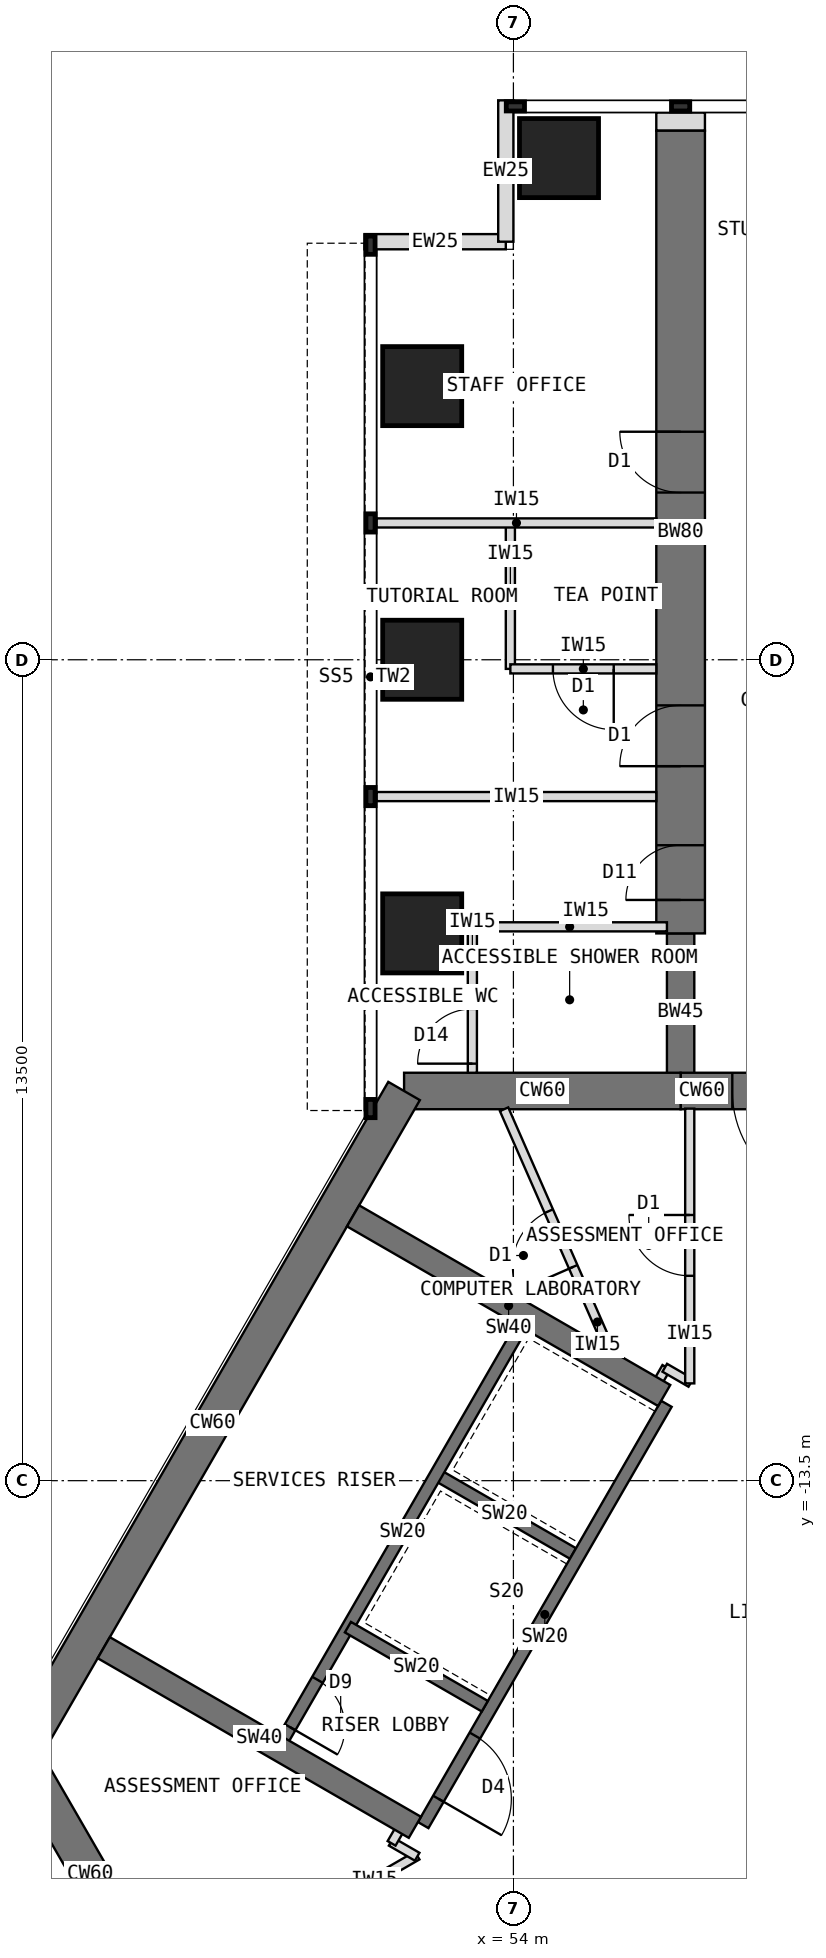
"""IFC4 building model, lengths in metres.
Left out: names, types, materials, properties, quantities, classifications, styles, units other than length and angle.
Written with IfcOpenShell. Run it as: python <this file> out.ifc"""

import sys

from ifc_helpers import new_model, si_unit, direction, frame, frame_2d, origin, origin_2d, place, context, subcontext, project, spatial, rectangle, extrude, element, fill, save


model = new_model("IFC4")
c1 = context("Model", 3, precision=1e-05, world=origin(), true_north=direction((0.0, 1.0)))
c2 = subcontext(c1, "Body", "Model", "MODEL_VIEW")
j1 = project(units=[si_unit("LENGTHUNIT", "METRE"), si_unit("PLANEANGLEUNIT", "RADIAN")], contexts=[c1])
p1 = place(None, origin())
s1 = spatial("IfcSite", under=j1, at=p1, CompositionType="ELEMENT")
p2 = place(p1, origin())
s2 = spatial("IfcBuilding", under=s1, at=p2, CompositionType="ELEMENT")
p3 = place(p2, frame((0.0, 0.0, 121.5)))
s3 = spatial("IfcBuildingStorey", under=s2, at=p3, CompositionType="ELEMENT", Elevation=121.5)
p4 = place(p3, frame((60.25, -7.092, 0.0), z_axis=(0.0, 0.0, 1.0), x_axis=(-1.0, 0.0, 0.0)))
e1 = element("IfcWall", 1, at=p4, inside=s3, PredefinedType="SHEAR", context=c2, shape_type="SweptSolid", body=[
    extrude(rectangle(XDim=3.5, YDim=0.6, at=frame_2d((1.75, 0.0))), origin(), (0.0, 0.0, 1.0), 4.0),
])
p5 = place(p4, frame((0.85, 0.0, 0.0)))
e2 = element("IfcOpeningElement", 2, at=p5, cuts=e1, PredefinedType="OPENING", context=c2, shape_type="SweptSolid", body=[
    extrude(rectangle(XDim=1.8, YDim=2.1, at=frame_2d((0.9, 1.05))), frame((0.0, 0.31, 0.0), z_axis=(0.0, -1.0, 0.0), x_axis=(1.0, 0.0, 0.0)), (0.0, 0.0, 1.0), 0.62),
])
p6 = place(p3, frame((56.75, -7.092, 0.0), z_axis=(0.0, 0.0, 1.0), x_axis=(-1.0, 0.0, 0.0)))
e3 = element("IfcWall", 3, at=p6, inside=s3, PredefinedType="SHEAR", context=c2, shape_type="SweptSolid", body=[
    extrude(rectangle(XDim=4.548, YDim=0.6, at=frame_2d((2.274, 0.0))), origin(), (0.0, 0.0, 1.0), 4.0),
])
p7 = place(p3, frame((52.202, -7.092, 0.0), z_axis=(0.0, 0.0, 1.0), x_axis=(-0.500005998175, -0.866021940709, 0.0)))
e4 = element("IfcWall", 4, at=p7, inside=s3, PredefinedType="SHEAR", context=c2, shape_type="SweptSolid", body=[
    extrude(rectangle(XDim=12.596, YDim=0.6, at=frame_2d((6.298, 0.0))), origin(), (0.0, 0.0, 1.0), 4.0),
])
p8 = place(p3, frame((45.904, -18.0, 0.0), z_axis=(0.0, 0.0, 1.0), x_axis=(0.500024481964, -0.866011268655, 0.0)))
e5 = element("IfcWall", 5, at=p8, inside=s3, PredefinedType="SHEAR", context=c2, shape_type="SweptSolid", body=[
    extrude(rectangle(XDim=4.548, YDim=0.6, at=frame_2d((2.274, 0.0))), origin(), (0.0, 0.0, 1.0), 4.0),
])
p9 = place(p3, frame((56.75, -7.092, 0.0), z_axis=(0.0, 0.0, 1.0), x_axis=(0.0, 1.0, 0.0)))
e6 = element("IfcWall", 6, at=p9, inside=s3, PredefinedType="SHEAR", context=c2, shape_type="SweptSolid", body=[
    extrude(rectangle(XDim=2.592, YDim=0.45, at=frame_2d((1.296, 0.0))), origin(), (0.0, 0.0, 1.0), 4.0),
])
p10 = place(p3, frame((56.75, -4.5, 0.0), z_axis=(0.0, 0.0, 1.0), x_axis=(0.0, 1.0, 0.0)))
e7 = element("IfcWall", 7, at=p10, inside=s3, PredefinedType="SHEAR", context=c2, shape_type="SweptSolid", body=[
    extrude(rectangle(XDim=13.2, YDim=0.8, at=frame_2d((6.6, 0.0))), origin(), (0.0, 0.0, 1.0), 4.0),
])
p11 = place(p10, frame((0.55, 0.0, 0.0)))
e8 = element("IfcOpeningElement", 8, at=p11, cuts=e7, PredefinedType="OPENING", context=c2, shape_type="SweptSolid", body=[
    extrude(rectangle(XDim=0.9, YDim=2.1, at=frame_2d((0.45, 1.05))), frame((0.0, 0.41, 0.0), z_axis=(0.0, -1.0, 0.0), x_axis=(1.0, 0.0, 0.0)), (0.0, 0.0, 1.0), 0.82),
])
p12 = place(p10, frame((2.75, 0.0, 0.0)))
e9 = element("IfcOpeningElement", 9, at=p12, cuts=e7, PredefinedType="OPENING", context=c2, shape_type="SweptSolid", body=[
    extrude(rectangle(XDim=1.0, YDim=2.1, at=frame_2d((0.5, 1.05))), frame((0.0, 0.41, 0.0), z_axis=(0.0, -1.0, 0.0), x_axis=(1.0, 0.0, 0.0)), (0.0, 0.0, 1.0), 0.82),
])
p13 = place(p10, frame((7.25, 0.0, 0.0)))
e10 = element("IfcOpeningElement", 10, at=p13, cuts=e7, PredefinedType="OPENING", context=c2, shape_type="SweptSolid", body=[
    extrude(rectangle(XDim=1.0, YDim=2.1, at=frame_2d((0.5, 1.05))), frame((0.0, 0.41, 0.0), z_axis=(0.0, -1.0, 0.0), x_axis=(1.0, 0.0, 0.0)), (0.0, 0.0, 1.0), 0.82),
])
for number, where, z_axis, x_axis in (
    (11, (52.5, -4.5, 0.0), (0.0, 0.0, 1.0), (1.0, 0.0, 0.0)),
    (12, (52.5, 0.0, 0.0), (0.0, 0.0, 1.0), (1.0, 0.0, 0.0)),
    (13, (52.5, 4.5, 0.0), (0.0, 0.0, 1.0), (1.0, 0.0, 0.0)),
    (14, (54.75, 8.25, 0.0), (0.0, 0.0, 1.0), (1.0, 0.0, 0.0)),
):
    element("IfcColumn", number, at=place(p3, frame(where, z_axis=z_axis, x_axis=x_axis)), inside=s3, PredefinedType="COLUMN", context=c2, shape_type="SweptSolid", body=[
        extrude(rectangle(XDim=1.3, YDim=1.3, at=origin_2d()), origin(), (0.0, 0.0, 1.0), 4.0),
    ])
for number, where, z_axis, x_axis in (
    (15, (51.55, 6.875, 0.0), (0.0, 0.0, 1.0), (1.0, 0.0, 0.0)),
    (16, (53.875, 6.875, 0.0), (0.0, 0.0, 1.0), (0.0, 1.0, 0.0)),
):
    element("IfcWall", number, at=place(p3, frame(where, z_axis=z_axis, x_axis=x_axis)), inside=s3, PredefinedType="STANDARD", context=c2, shape_type="SweptSolid", body=[
        extrude(rectangle(XDim=2.325, YDim=0.25, at=frame_2d((1.163, 0.0))), origin(), (0.0, 0.0, 1.0), 3.8),
    ])
p14 = place(p3, frame((56.75, 8.7, 0.0), z_axis=(0.0, 0.0, 1.0), x_axis=(0.0, 1.0, 0.0)))
e17 = element("IfcWall", 17, at=p14, inside=s3, PredefinedType="PARTITIONING", context=c2, shape_type="SweptSolid", body=[
    extrude(rectangle(XDim=0.3, YDim=0.8, at=frame_2d((0.15, 0.0))), origin(), (0.0, 0.0, 1.0), 3.8),
])
p15 = place(p3, frame((56.516, -12.236, 0.0), z_axis=(0.0, 0.0, 1.0), x_axis=(-0.49999894854, -0.866026010844, 0.0)))
e18 = element("IfcWall", 18, at=p15, inside=s3, PredefinedType="SHEAR", context=c2, shape_type="SweptSolid", body=[
    extrude(rectangle(XDim=8.0, YDim=0.2, at=frame_2d((4.0, 0.0))), origin(), (0.0, 0.0, 1.0), 4.0),
])
p16 = place(p15, frame((6.3, 0.0, 0.0)))
e19 = element("IfcOpeningElement", 19, at=p16, cuts=e18, PredefinedType="OPENING", context=c2, shape_type="SweptSolid", body=[
    extrude(rectangle(XDim=1.2, YDim=2.1, at=frame_2d((0.6, 1.05))), frame((0.0, 0.11, 0.0), z_axis=(0.0, -1.0, 0.0), x_axis=(1.0, 0.0, 0.0)), (0.0, 0.0, 1.0), 0.22),
])
for number, where, z_axis, x_axis in (
    (20, (54.98, -14.697, 0.0), (0.0, 0.0, 1.0), (-0.866, 0.5, 0.0)),
    (21, (53.53, -17.209, 0.0), (0.0, 0.0, 1.0), (-0.866, 0.5, 0.0)),
):
    element("IfcWall", number, at=place(p3, frame(where, z_axis=z_axis, x_axis=x_axis)), inside=s3, PredefinedType="SHEAR", context=c2, shape_type="SweptSolid", body=[
        extrude(rectangle(XDim=2.6, YDim=0.2, at=frame_2d((1.3, 0.0))), origin(), (0.0, 0.0, 1.0), 4.0),
    ])
p17 = place(p3, frame((54.178, -10.886, 0.0), z_axis=(0.0, 0.0, 1.0), x_axis=(-0.49999894854, -0.866026010844, 0.0)))
e22 = element("IfcWall", 22, at=p17, inside=s3, PredefinedType="SHEAR", context=c2, shape_type="SweptSolid", body=[
    extrude(rectangle(XDim=8.0, YDim=0.2, at=frame_2d((4.0, 0.0))), origin(), (0.0, 0.0, 1.0), 4.0),
])
p18 = place(p17, frame((6.8, 0.0, 0.0)))
e23 = element("IfcOpeningElement", 23, at=p18, cuts=e22, PredefinedType="OPENING", context=c2, shape_type="SweptSolid", body=[
    extrude(rectangle(XDim=0.9, YDim=2.1, at=frame_2d((0.45, 1.05))), frame((0.0, 0.11, 0.0), z_axis=(0.0, -1.0, 0.0), x_axis=(1.0, 0.0, 0.0)), (0.0, 0.0, 1.0), 0.22),
])
p19 = place(p3, frame((52.38, -19.201, 0.0), z_axis=(0.0, 0.0, 1.0), x_axis=(-0.866027317282, 0.49999668571, 0.0)))
e24 = element("IfcWall", 24, at=p19, inside=s3, PredefinedType="SHEAR", context=c2, shape_type="SweptSolid", body=[
    extrude(rectangle(XDim=5.908, YDim=0.4, at=frame_2d((2.954, 0.0))), origin(), (0.0, 0.0, 1.0), 4.0),
])
p20 = place(p3, frame((56.48, -12.099, 0.0), z_axis=(0.0, 0.0, 1.0), x_axis=(-0.866009424208, 0.500027676417, 0.0)))
e25 = element("IfcWall", 25, at=p20, inside=s3, PredefinedType="SHEAR", context=c2, shape_type="SweptSolid", body=[
    extrude(rectangle(XDim=5.908, YDim=0.4, at=frame_2d((2.954, 0.0))), origin(), (0.0, 0.0, 1.0), 4.0),
])
for number, where, z_axis, x_axis in (
    (26, (56.35, -2.25, 0.0), (0.0, 0.0, 1.0), (-1.0, 0.0, 0.0)),
    (27, (56.35, 2.25, 0.0), (0.0, 0.0, 1.0), (-1.0, 0.0, 0.0)),
):
    element("IfcWall", number, at=place(p3, frame(where, z_axis=z_axis, x_axis=x_axis)), inside=s3, PredefinedType="PARTITIONING", context=c2, shape_type="SweptSolid", body=[
        extrude(rectangle(XDim=4.6, YDim=0.15, at=frame_2d((2.3, 0.0))), origin(), (0.0, 0.0, 1.0), 3.8),
    ])
p21 = place(p3, frame((53.95, -0.15, 0.0), z_axis=(0.0, 0.0, 1.0), x_axis=(0.0, 1.0, 0.0)))
e28 = element("IfcWall", 28, at=p21, inside=s3, PredefinedType="PARTITIONING", context=c2, shape_type="SweptSolid", body=[
    extrude(rectangle(XDim=2.4, YDim=0.15, at=frame_2d((1.2, 0.0))), origin(), (0.0, 0.0, 1.0), 3.8),
])
p22 = place(p3, frame((56.35, -0.15, 0.0), z_axis=(0.0, 0.0, 1.0), x_axis=(-1.0, 0.0, 0.0)))
e29 = element("IfcWall", 29, at=p22, inside=s3, PredefinedType="PARTITIONING", context=c2, shape_type="SweptSolid", body=[
    extrude(rectangle(XDim=2.4, YDim=0.15, at=frame_2d((1.2, 0.0))), origin(), (0.0, 0.0, 1.0), 3.8),
])
p23 = place(p22, frame((0.7, 0.0, 0.0)))
e30 = element("IfcOpeningElement", 30, at=p23, cuts=e29, PredefinedType="OPENING", context=c2, shape_type="SweptSolid", body=[
    extrude(rectangle(XDim=1.0, YDim=2.1, at=frame_2d((0.5, 1.05))), frame((0.0, 0.085, 0.0), z_axis=(0.0, -1.0, 0.0), x_axis=(1.0, 0.0, 0.0)), (0.0, 0.0, 1.0), 0.17),
])
p24 = place(p3, frame((53.325, -6.792, 0.0), z_axis=(0.0, 0.0, 1.0), x_axis=(0.0, 1.0, 0.0)))
e31 = element("IfcWall", 31, at=p24, inside=s3, PredefinedType="PARTITIONING", context=c2, shape_type="SweptSolid", body=[
    extrude(rectangle(XDim=2.4, YDim=0.15, at=frame_2d((1.2, 0.0))), origin(), (0.0, 0.0, 1.0), 3.8),
])
p25 = place(p24, frame((0.15, 0.0, 0.0)))
e32 = element("IfcOpeningElement", 32, at=p25, cuts=e31, PredefinedType="OPENING", context=c2, shape_type="SweptSolid", body=[
    extrude(rectangle(XDim=0.9, YDim=2.1, at=frame_2d((0.45, 1.05))), frame((0.0, 0.085, 0.0), z_axis=(0.0, -1.0, 0.0), x_axis=(1.0, 0.0, 0.0)), (0.0, 0.0, 1.0), 0.17),
])
p26 = place(p3, frame((56.525, -4.392, 0.0), z_axis=(0.0, 0.0, 1.0), x_axis=(-1.0, 0.0, 0.0)))
e33 = element("IfcWall", 33, at=p26, inside=s3, PredefinedType="PARTITIONING", context=c2, shape_type="SweptSolid", body=[
    extrude(rectangle(XDim=3.2, YDim=0.15, at=frame_2d((1.6, 0.0))), origin(), (0.0, 0.0, 1.0), 3.8),
])
p27 = place(p3, frame((48.504, -21.924, 0.0), z_axis=(0.0, 0.0, 1.0), x_axis=(0.866006515865, 0.500032713409, 0.0)))
e34 = element("IfcWall", 34, at=p27, inside=s3, PredefinedType="PARTITIONING", context=c2, shape_type="SweptSolid", body=[
    extrude(rectangle(XDim=4.518, YDim=0.15, at=frame_2d((2.259, 0.0))), origin(), (0.0, 0.0, 1.0), 3.8),
])
p28 = place(p27, frame((1.749, 0.0, 0.0)))
e35 = element("IfcOpeningElement", 35, at=p28, cuts=e34, PredefinedType="OPENING", context=c2, shape_type="SweptSolid", body=[
    extrude(rectangle(XDim=1.0, YDim=2.1, at=frame_2d((0.5, 1.05))), frame((0.0, 0.085, 0.0), z_axis=(0.0, -1.0, 0.0), x_axis=(1.0, 0.0, 0.0)), (0.0, 0.0, 1.0), 0.17),
])
p29 = place(p3, frame((52.417, -19.684, 0.0), z_axis=(0.0, 0.0, 1.0), x_axis=(-0.865831790172, 0.50033519877, 0.0)))
e36 = element("IfcWall", 36, at=p29, inside=s3, PredefinedType="PARTITIONING", context=c2, shape_type="SweptSolid", body=[
    extrude(rectangle(XDim=0.494, YDim=0.15, at=frame_2d((0.247, 0.0))), origin(), (0.0, 0.0, 1.0), 3.8),
])
for number, where, z_axis, x_axis in (
    (37, (51.997, -19.464, 0.0), (0.0, 0.0, 1.0), (0.5, 0.866, 0.0)),
    (38, (56.302, -12.008, 0.0), (0.0, 0.0, 1.0), (0.5, 0.866, 0.0)),
):
    element("IfcWall", number, at=place(p3, frame(where, z_axis=z_axis, x_axis=x_axis)), inside=s3, PredefinedType="PARTITIONING", context=c2, shape_type="SweptSolid", body=[
        extrude(rectangle(XDim=0.43, YDim=0.15, at=frame_2d((0.215, 0.0))), origin(), (0.0, 0.0, 1.0), 3.8),
    ])
p30 = place(p3, frame((56.489, -11.643, 0.0), z_axis=(0.0, 0.0, 1.0), x_axis=(0.865831790172, -0.50033519877, 0.0)))
e39 = element("IfcWall", 39, at=p30, inside=s3, PredefinedType="PARTITIONING", context=c2, shape_type="SweptSolid", body=[
    extrude(rectangle(XDim=0.494, YDim=0.15, at=frame_2d((0.247, 0.0))), origin(), (0.0, 0.0, 1.0), 3.8),
])
p31 = place(p3, frame((56.9, -11.9, 0.0), z_axis=(0.0, 0.0, 1.0), x_axis=(0.0, 1.0, 0.0)))
e40 = element("IfcWall", 40, at=p31, inside=s3, PredefinedType="PARTITIONING", context=c2, shape_type="SweptSolid", body=[
    extrude(rectangle(XDim=4.519, YDim=0.15, at=frame_2d((2.259, 0.0))), origin(), (0.0, 0.0, 1.0), 3.8),
])
p32 = place(p31, frame((1.769, 0.0, 0.0)))
e41 = element("IfcOpeningElement", 41, at=p32, cuts=e40, PredefinedType="OPENING", context=c2, shape_type="SweptSolid", body=[
    extrude(rectangle(XDim=1.0, YDim=2.1, at=frame_2d((0.5, 1.05))), frame((0.0, 0.085, 0.0), z_axis=(0.0, -1.0, 0.0), x_axis=(1.0, 0.0, 0.0)), (0.0, 0.0, 1.0), 0.17),
])
p33 = place(p3, frame((55.719, -11.66, 0.0), z_axis=(0.0, 0.0, 1.0), x_axis=(-0.401686926791, 0.915777054116, 0.0)))
e42 = element("IfcWall", 42, at=p33, inside=s3, PredefinedType="PARTITIONING", context=c2, shape_type="SweptSolid", body=[
    extrude(rectangle(XDim=4.661, YDim=0.15, at=frame_2d((2.331, 0.0))), origin(), (0.0, 0.0, 1.0), 3.8),
])
p34 = place(p33, frame((1.831, 0.0, 0.0)))
e43 = element("IfcOpeningElement", 43, at=p34, cuts=e42, PredefinedType="OPENING", context=c2, shape_type="SweptSolid", body=[
    extrude(rectangle(XDim=1.0, YDim=2.1, at=frame_2d((0.5, 1.05))), frame((0.0, 0.085, 0.0), z_axis=(0.0, -1.0, 0.0), x_axis=(1.0, 0.0, 0.0)), (0.0, 0.0, 1.0), 0.17),
])
p35 = place(p16, origin())
e44 = element("IfcDoor", 44, at=p35, inside=s3, OperationType="SINGLE_SWING_RIGHT", PredefinedType="DOOR", context=c2, shape_type="SweptSolid", body=[
    extrude(rectangle(XDim=1.2, YDim=2.1, at=frame_2d((0.6, 1.05))), frame((0.0, 0.025, 0.0), z_axis=(0.0, -1.0, 0.0), x_axis=(1.0, 0.0, 0.0)), (0.0, 0.0, 1.0), 0.05),
])
fill(e19, e44)
p36 = place(p18, origin())
e45 = element("IfcDoor", 45, at=p36, inside=s3, OperationType="SINGLE_SWING_RIGHT", PredefinedType="DOOR", context=c2, shape_type="SweptSolid", body=[
    extrude(rectangle(XDim=0.9, YDim=2.1, at=frame_2d((0.45, 1.05))), frame((0.0, 0.025, 0.0), z_axis=(0.0, -1.0, 0.0), x_axis=(1.0, 0.0, 0.0)), (0.0, 0.0, 1.0), 0.05),
])
fill(e23, e45)
p37 = place(p5, origin())
e46 = element("IfcDoor", 46, at=p37, inside=s3, OperationType="DOUBLE_DOOR_DOUBLE_SWING", PredefinedType="DOOR", context=c2, shape_type="SweptSolid", body=[
    extrude(rectangle(XDim=1.72, YDim=2.06, at=frame_2d((0.9, 1.03))), frame((0.0, 0.025, 0.0), z_axis=(0.0, -1.0, 0.0), x_axis=(1.0, 0.0, 0.0)), (0.0, 0.0, 1.0), 0.05),
    extrude(rectangle(XDim=0.04, YDim=2.1, at=frame_2d((0.02, 1.05))), frame((0.0, 0.3, 0.0), z_axis=(0.0, -1.0, 0.0), x_axis=(1.0, 0.0, 0.0)), (0.0, 0.0, 1.0), 0.6),
    extrude(rectangle(XDim=0.04, YDim=2.1, at=frame_2d((1.78, 1.05))), frame((0.0, 0.3, 0.0), z_axis=(0.0, -1.0, 0.0), x_axis=(1.0, 0.0, 0.0)), (0.0, 0.0, 1.0), 0.6),
    extrude(rectangle(XDim=1.72, YDim=0.04, at=frame_2d((0.9, 2.08))), frame((0.0, 0.3, 0.0), z_axis=(0.0, -1.0, 0.0), x_axis=(1.0, 0.0, 0.0)), (0.0, 0.0, 1.0), 0.6),
])
fill(e2, e46)
p38 = place(p23, origin())
e47 = element("IfcDoor", 47, at=p38, inside=s3, OperationType="SINGLE_SWING_LEFT", PredefinedType="DOOR", context=c2, shape_type="SweptSolid", body=[
    extrude(rectangle(XDim=1.0, YDim=2.1, at=frame_2d((0.5, 1.05))), frame((0.0, 0.025, 0.0), z_axis=(0.0, -1.0, 0.0), x_axis=(1.0, 0.0, 0.0)), (0.0, 0.0, 1.0), 0.05),
])
fill(e30, e47)
p39 = place(p25, origin())
e48 = element("IfcDoor", 48, at=p39, inside=s3, OperationType="SINGLE_SWING_LEFT", PredefinedType="DOOR", context=c2, shape_type="SweptSolid", body=[
    extrude(rectangle(XDim=0.9, YDim=2.1, at=frame_2d((0.45, 1.05))), frame((0.0, 0.025, 0.0), z_axis=(0.0, -1.0, 0.0), x_axis=(1.0, 0.0, 0.0)), (0.0, 0.0, 1.0), 0.05),
])
fill(e32, e48)
p40 = place(p34, origin())
e49 = element("IfcDoor", 49, at=p40, inside=s3, OperationType="SINGLE_SWING_LEFT", PredefinedType="DOOR", context=c2, shape_type="SweptSolid", body=[
    extrude(rectangle(XDim=1.0, YDim=2.1, at=frame_2d((0.5, 1.05))), frame((0.0, 0.025, 0.0), z_axis=(0.0, -1.0, 0.0), x_axis=(1.0, 0.0, 0.0)), (0.0, 0.0, 1.0), 0.05),
])
fill(e43, e49)
p41 = place(p32, origin())
e50 = element("IfcDoor", 50, at=p41, inside=s3, OperationType="SINGLE_SWING_RIGHT", PredefinedType="DOOR", context=c2, shape_type="SweptSolid", body=[
    extrude(rectangle(XDim=1.0, YDim=2.1, at=frame_2d((0.5, 1.05))), frame((0.0, 0.025, 0.0), z_axis=(0.0, -1.0, 0.0), x_axis=(1.0, 0.0, 0.0)), (0.0, 0.0, 1.0), 0.05),
])
fill(e41, e50)
p42 = place(p11, origin())
e51 = element("IfcDoor", 51, at=p42, inside=s3, OperationType="SINGLE_SWING_LEFT", PredefinedType="DOOR", context=c2, shape_type="SweptSolid", body=[
    extrude(rectangle(XDim=0.82, YDim=2.06, at=frame_2d((0.45, 1.03))), frame((0.0, 0.025, 0.0), z_axis=(0.0, -1.0, 0.0), x_axis=(1.0, 0.0, 0.0)), (0.0, 0.0, 1.0), 0.05),
    extrude(rectangle(XDim=0.04, YDim=2.1, at=frame_2d((0.02, 1.05))), frame((0.0, 0.4, 0.0), z_axis=(0.0, -1.0, 0.0), x_axis=(1.0, 0.0, 0.0)), (0.0, 0.0, 1.0), 0.8),
    extrude(rectangle(XDim=0.04, YDim=2.1, at=frame_2d((0.88, 1.05))), frame((0.0, 0.4, 0.0), z_axis=(0.0, -1.0, 0.0), x_axis=(1.0, 0.0, 0.0)), (0.0, 0.0, 1.0), 0.8),
    extrude(rectangle(XDim=0.82, YDim=0.04, at=frame_2d((0.45, 2.08))), frame((0.0, 0.4, 0.0), z_axis=(0.0, -1.0, 0.0), x_axis=(1.0, 0.0, 0.0)), (0.0, 0.0, 1.0), 0.8),
])
fill(e8, e51)
p43 = place(p12, origin())
e52 = element("IfcDoor", 52, at=p43, inside=s3, OperationType="SINGLE_SWING_LEFT", PredefinedType="DOOR", context=c2, shape_type="SweptSolid", body=[
    extrude(rectangle(XDim=0.92, YDim=2.06, at=frame_2d((0.5, 1.03))), frame((0.0, 0.025, 0.0), z_axis=(0.0, -1.0, 0.0), x_axis=(1.0, 0.0, 0.0)), (0.0, 0.0, 1.0), 0.05),
    extrude(rectangle(XDim=0.04, YDim=2.1, at=frame_2d((0.02, 1.05))), frame((0.0, 0.4, 0.0), z_axis=(0.0, -1.0, 0.0), x_axis=(1.0, 0.0, 0.0)), (0.0, 0.0, 1.0), 0.8),
    extrude(rectangle(XDim=0.04, YDim=2.1, at=frame_2d((0.98, 1.05))), frame((0.0, 0.4, 0.0), z_axis=(0.0, -1.0, 0.0), x_axis=(1.0, 0.0, 0.0)), (0.0, 0.0, 1.0), 0.8),
    extrude(rectangle(XDim=0.92, YDim=0.04, at=frame_2d((0.5, 2.08))), frame((0.0, 0.4, 0.0), z_axis=(0.0, -1.0, 0.0), x_axis=(1.0, 0.0, 0.0)), (0.0, 0.0, 1.0), 0.8),
])
fill(e9, e52)
p44 = place(p13, origin())
e53 = element("IfcDoor", 53, at=p44, inside=s3, OperationType="SINGLE_SWING_RIGHT", PredefinedType="DOOR", context=c2, shape_type="SweptSolid", body=[
    extrude(rectangle(XDim=0.92, YDim=2.06, at=frame_2d((0.5, 1.03))), frame((0.0, 0.025, 0.0), z_axis=(0.0, -1.0, 0.0), x_axis=(1.0, 0.0, 0.0)), (0.0, 0.0, 1.0), 0.05),
    extrude(rectangle(XDim=0.04, YDim=2.1, at=frame_2d((0.02, 1.05))), frame((0.0, 0.4, 0.0), z_axis=(0.0, -1.0, 0.0), x_axis=(1.0, 0.0, 0.0)), (0.0, 0.0, 1.0), 0.8),
    extrude(rectangle(XDim=0.04, YDim=2.1, at=frame_2d((0.98, 1.05))), frame((0.0, 0.4, 0.0), z_axis=(0.0, -1.0, 0.0), x_axis=(1.0, 0.0, 0.0)), (0.0, 0.0, 1.0), 0.8),
    extrude(rectangle(XDim=0.92, YDim=0.04, at=frame_2d((0.5, 2.08))), frame((0.0, 0.4, 0.0), z_axis=(0.0, -1.0, 0.0), x_axis=(1.0, 0.0, 0.0)), (0.0, 0.0, 1.0), 0.8),
])
fill(e10, e53)
save(model, sys.argv[1])
